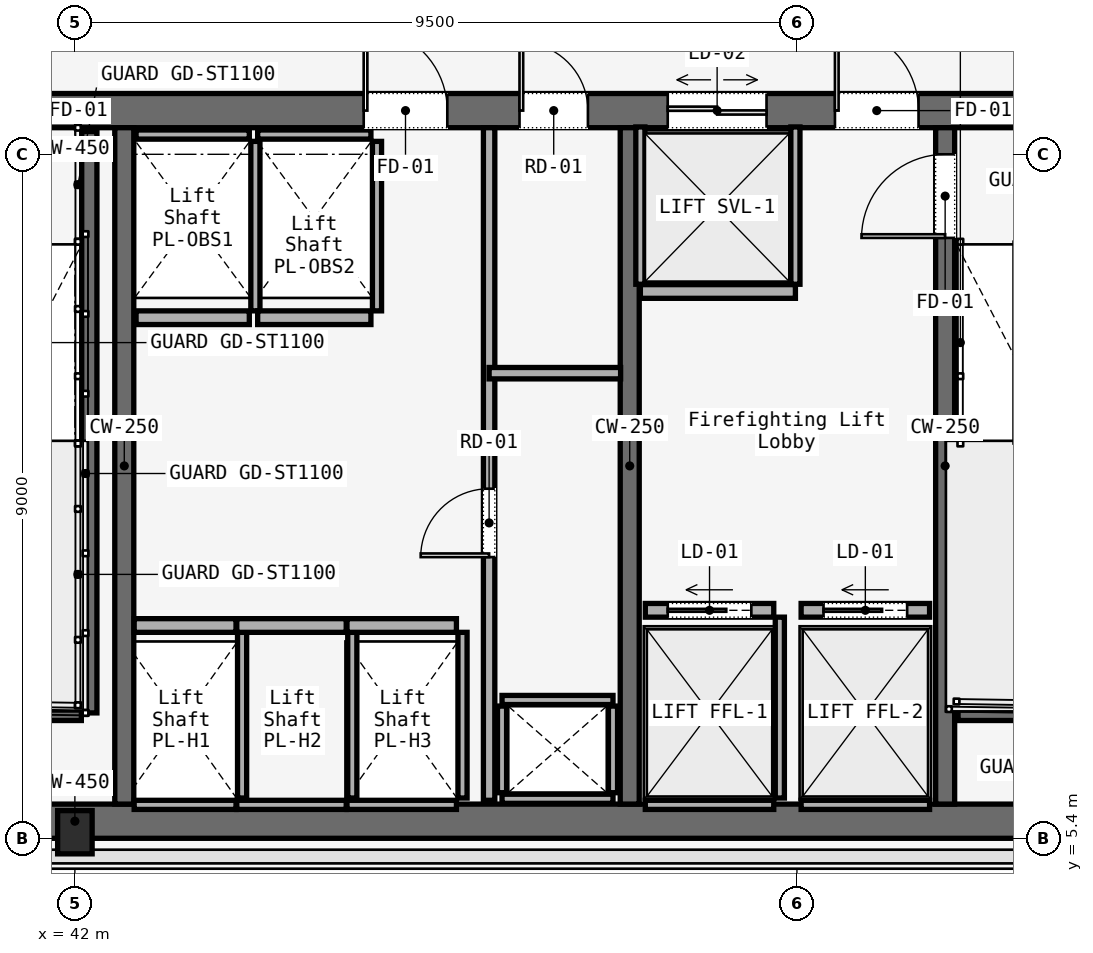
"""IFC4 building model, lengths in metres.
Left out: names, types, materials, properties, quantities, classifications, styles, units other than length and angle.
Written with IfcOpenShell. Run it as: python <this file> out.ifc"""

import sys

from ifc_helpers import new_model, si_unit, direction, frame, frame_2d, origin, origin_2d, place, context, subcontext, project, spatial, rectangle, i_section, extrude, element, fill, save


model = new_model("IFC4")
c1 = context("Model", 3, precision=1e-05, world=origin(), true_north=direction((0.0, 1.0)))
c2 = subcontext(c1, "Body", "Model", "MODEL_VIEW")
j1 = project(units=[si_unit("LENGTHUNIT", "METRE"), si_unit("PLANEANGLEUNIT", "RADIAN")], contexts=[c1])
p1 = place(None, origin())
s1 = spatial("IfcSite", under=j1, at=p1, CompositionType="ELEMENT")
p2 = place(p1, origin())
s2 = spatial("IfcBuilding", under=s1, at=p2, CompositionType="ELEMENT")
p3 = place(p2, frame((0.0, 0.0, 43.6)))
s3 = spatial("IfcBuildingStorey", under=s2, at=p3, CompositionType="ELEMENT", Elevation=43.6)
p4 = place(p3, frame((26.45, 14.975, 0.0), z_axis=(0.0, 0.0, 1.0), x_axis=(1.0, 0.0, 0.0)))
e1 = element("IfcWall", 1, at=p4, inside=s3, PredefinedType="SOLIDWALL", context=c2, shape_type="SweptSolid", body=[
    extrude(rectangle(XDim=31.1, YDim=0.45, at=frame_2d((15.55, 0.0))), origin(), (0.0, 0.0, 1.0), 3.58),
])
p5 = place(p4, frame((1.65, 0.0, 0.0)))
e2 = element("IfcOpeningElement", 2, at=p5, cuts=e1, PredefinedType="OPENING", context=c2, shape_type="SweptSolid", body=[
    extrude(rectangle(XDim=1.1, YDim=2.2, at=frame_2d((0.55, 1.1))), frame((0.0, 0.225, 0.0), z_axis=(0.0, -1.0, 0.0), x_axis=(1.0, 0.0, 0.0)), (0.0, 0.0, 1.0), 0.45),
])
p6 = place(p4, frame((13.65, 0.0, 0.0)))
e3 = element("IfcOpeningElement", 3, at=p6, cuts=e1, PredefinedType="OPENING", context=c2, shape_type="SweptSolid", body=[
    extrude(rectangle(XDim=1.1, YDim=2.2, at=frame_2d((0.55, 1.1))), frame((0.0, 0.225, 0.0), z_axis=(0.0, -1.0, 0.0), x_axis=(1.0, 0.0, 0.0)), (0.0, 0.0, 1.0), 0.45),
])
p7 = place(p4, frame((25.55, 0.0, 0.0)))
e4 = element("IfcOpeningElement", 4, at=p7, cuts=e1, PredefinedType="OPENING", context=c2, shape_type="SweptSolid", body=[
    extrude(rectangle(XDim=1.1, YDim=2.2, at=frame_2d((0.55, 1.1))), frame((0.0, 0.225, 0.0), z_axis=(0.0, -1.0, 0.0), x_axis=(1.0, 0.0, 0.0)), (0.0, 0.0, 1.0), 0.45),
])
p8 = place(p4, frame((10.7, 0.0, 0.0)))
e5 = element("IfcOpeningElement", 5, at=p8, cuts=e1, PredefinedType="OPENING", context=c2, shape_type="SweptSolid", body=[
    extrude(rectangle(XDim=1.4, YDim=2.2, at=frame_2d((0.7, 1.1))), frame((0.0, 0.225, 0.0), z_axis=(0.0, -1.0, 0.0), x_axis=(1.0, 0.0, 0.0)), (0.0, 0.0, 1.0), 0.45),
])
p9 = place(p4, frame((19.35, 0.0, 0.0)))
e6 = element("IfcOpeningElement", 6, at=p9, cuts=e1, PredefinedType="OPENING", context=c2, shape_type="SweptSolid", body=[
    extrude(rectangle(XDim=1.1, YDim=2.2, at=frame_2d((0.55, 1.1))), frame((0.0, 0.225, 0.0), z_axis=(0.0, -1.0, 0.0), x_axis=(1.0, 0.0, 0.0)), (0.0, 0.0, 1.0), 0.45),
])
p10 = place(p4, frame((21.4, 0.0, 0.0)))
e7 = element("IfcOpeningElement", 7, at=p10, cuts=e1, PredefinedType="OPENING", context=c2, shape_type="SweptSolid", body=[
    extrude(rectangle(XDim=0.9, YDim=2.1, at=frame_2d((0.45, 1.05))), frame((0.0, 0.225, 0.0), z_axis=(0.0, -1.0, 0.0), x_axis=(1.0, 0.0, 0.0)), (0.0, 0.0, 1.0), 0.45),
])
p11 = place(p4, frame((23.35, 0.0, 0.0)))
e8 = element("IfcOpeningElement", 8, at=p11, cuts=e1, PredefinedType="OPENING", context=c2, shape_type="SweptSolid", body=[
    extrude(rectangle(XDim=1.3, YDim=2.3, at=frame_2d((0.65, 1.15))), frame((0.0, 0.225, 0.0), z_axis=(0.0, -1.0, 0.0), x_axis=(1.0, 0.0, 0.0)), (0.0, 0.0, 1.0), 0.45),
])
p12 = place(p3, frame((26.45, 5.625, 0.0), z_axis=(0.0, 0.0, 1.0), x_axis=(1.0, 0.0, 0.0)))
e9 = element("IfcWall", 9, at=p12, inside=s3, PredefinedType="SOLIDWALL", context=c2, shape_type="SweptSolid", body=[
    extrude(rectangle(XDim=31.1, YDim=0.45, at=frame_2d((15.55, 0.0))), origin(), (0.0, 0.0, 1.0), 3.58),
])
for number, where, z_axis, x_axis in (
    (10, (42.65, 5.85, 0.0), (0.0, 0.0, 1.0), (0.0, 1.0, 0.0)),
    (11, (49.3, 5.85, 0.0), (0.0, 0.0, 1.0), (0.0, 1.0, 0.0)),
):
    element("IfcWall", number, at=place(p3, frame(where, z_axis=z_axis, x_axis=x_axis)), inside=s3, PredefinedType="SOLIDWALL", context=c2, shape_type="SweptSolid", body=[
        extrude(rectangle(XDim=8.9, YDim=0.25, at=frame_2d((4.45, 0.0))), origin(), (0.0, 0.0, 1.0), 3.58),
    ])
p13 = place(p3, frame((53.45, 5.85, 0.0), z_axis=(0.0, 0.0, 1.0), x_axis=(0.0, 1.0, 0.0)))
e12 = element("IfcWall", 12, at=p13, inside=s3, PredefinedType="SOLIDWALL", context=c2, shape_type="SweptSolid", body=[
    extrude(rectangle(XDim=8.9, YDim=0.25, at=frame_2d((4.45, 0.0))), origin(), (0.0, 0.0, 1.0), 3.58),
])
p14 = place(p13, frame((7.45, 0.0, 0.0)))
e13 = element("IfcOpeningElement", 13, at=p14, cuts=e12, PredefinedType="OPENING", context=c2, shape_type="SweptSolid", body=[
    extrude(rectangle(XDim=1.1, YDim=2.2, at=frame_2d((0.55, 1.1))), frame((0.0, 0.125, 0.0), z_axis=(0.0, -1.0, 0.0), x_axis=(1.0, 0.0, 0.0)), (0.0, 0.0, 1.0), 0.25),
])
p15 = place(p3, frame((42.0, 5.48, 0.0), z_axis=(0.0, 0.0, 1.0), x_axis=(1.0, 0.0, 0.0)))
e14 = element("IfcColumn", 14, at=p15, inside=s3, PredefinedType="COLUMN", context=c2, shape_type="SweptSolid", body=[
    extrude(i_section(OverallWidth=0.454, OverallDepth=0.569, WebThickness=0.078, FlangeThickness=0.08, FilletRadius=0.015, at=origin_2d()), origin(), (0.0, 0.0, 1.0), 3.58),
])
p16 = place(p3, frame((42.19, 14.7, 0.0), z_axis=(0.0, 0.0, 1.0), x_axis=(0.0, -1.0, 0.0)))
e15 = element("IfcWall", 15, at=p16, inside=s3, PredefinedType="SOLIDWALL", context=c2, shape_type="SweptSolid", body=[
    extrude(rectangle(XDim=7.65, YDim=0.2, at=frame_2d((3.825, 0.0))), origin(), (0.0, 0.0, 1.0), 3.8),
])
for number, where, z_axis, x_axis in (
    (16, (38.97, 7.05, 0.0), (0.0, 0.0, 1.0), (1.0, 0.0, 0.0)),
    (17, (53.62, 7.05, 0.0), (0.0, 0.0, 1.0), (1.0, 0.0, 0.0)),
):
    element("IfcWall", number, at=place(p3, frame(where, z_axis=z_axis, x_axis=x_axis)), inside=s3, PredefinedType="SOLIDWALL", context=c2, shape_type="SweptSolid", body=[
        extrude(rectangle(XDim=3.115, YDim=0.2, at=frame_2d((1.558, 0.0))), origin(), (0.0, 0.0, 1.0), 3.8),
    ])
for number, where, z_axis, x_axis in (
    (18, (47.62, 5.92, 0.0), (0.0, 0.0, 1.0), (1.0, 0.0, 0.0)),
    (19, (47.62, 7.22, 0.0), (0.0, 0.0, 1.0), (1.0, 0.0, 0.0)),
):
    element("IfcWall", number, at=place(p3, frame(where, z_axis=z_axis, x_axis=x_axis)), inside=s3, PredefinedType="SOLIDWALL", context=c2, shape_type="SweptSolid", body=[
        extrude(rectangle(XDim=1.46, YDim=0.12, at=frame_2d((0.73, 0.0))), origin(), (0.0, 0.0, 1.0), 2.933),
    ])
for number, where, z_axis, x_axis in (
    (20, (47.62, 6.0, 0.0), (0.0, 0.0, 1.0), (0.0, 1.0, 0.0)),
    (21, (49.08, 6.0, 0.0), (0.0, 0.0, 1.0), (0.0, 1.0, 0.0)),
):
    element("IfcWall", number, at=place(p3, frame(where, z_axis=z_axis, x_axis=x_axis)), inside=s3, PredefinedType="SOLIDWALL", context=c2, shape_type="SweptSolid", body=[
        extrude(rectangle(XDim=1.14, YDim=0.12, at=frame_2d((0.57, 0.0))), origin(), (0.0, 0.0, 1.0), 2.933),
    ])
p17 = place(p3, frame((47.45, 5.9, 0.0), z_axis=(0.0, 0.0, 1.0), x_axis=(0.0, 1.0, 0.0)))
e22 = element("IfcWall", 22, at=p17, inside=s3, PredefinedType="PARTITIONING", context=c2, shape_type="SweptSolid", body=[
    extrude(rectangle(XDim=8.85, YDim=0.15, at=frame_2d((4.425, 0.0))), origin(), (0.0, 0.0, 1.0), 2.933),
])
p18 = place(p17, frame((3.2, 0.0, 0.0)))
e23 = element("IfcOpeningElement", 23, at=p18, cuts=e22, PredefinedType="OPENING", context=c2, shape_type="SweptSolid", body=[
    extrude(rectangle(XDim=0.9, YDim=2.1, at=frame_2d((0.45, 1.05))), frame((0.0, 0.075, 0.0), z_axis=(0.0, -1.0, 0.0), x_axis=(1.0, 0.0, 0.0)), (0.0, 0.0, 1.0), 0.15),
])
p19 = place(p3, frame((47.45, 11.52, 0.0), z_axis=(0.0, 0.0, 1.0), x_axis=(1.0, 0.0, 0.0)))
e24 = element("IfcWall", 24, at=p19, inside=s3, PredefinedType="PARTITIONING", context=c2, shape_type="SweptSolid", body=[
    extrude(rectangle(XDim=1.73, YDim=0.15, at=frame_2d((0.865, 0.0))), origin(), (0.0, 0.0, 1.0), 2.933),
])
p20 = place(p3, frame((42.78, 8.2, 0.0), z_axis=(0.0, 0.0, 1.0), x_axis=(1.0, 0.0, 0.0)))
e25 = element("IfcWall", 25, at=p20, inside=s3, PredefinedType="SOLIDWALL", context=c2, shape_type="SweptSolid", body=[
    extrude(rectangle(XDim=1.34, YDim=0.18, at=frame_2d((0.67, 0.0))), origin(), (0.0, 0.0, 1.0), 2.933),
])
p21 = place(p3, frame((42.78, 5.84, 0.0), z_axis=(0.0, 0.0, 1.0), x_axis=(1.0, 0.0, 0.0)))
e26 = element("IfcWall", 26, at=p21, inside=s3, PredefinedType="SOLIDWALL", context=c2, shape_type="SweptSolid", body=[
    extrude(rectangle(XDim=1.34, YDim=0.12, at=frame_2d((0.67, 0.0))), origin(), (0.0, 0.0, 1.0), 2.933),
])
p22 = place(p3, frame((44.2, 5.93, 0.0), z_axis=(0.0, 0.0, 1.0), x_axis=(0.0, 1.0, 0.0)))
e27 = element("IfcWall", 27, at=p22, inside=s3, PredefinedType="SOLIDWALL", context=c2, shape_type="SweptSolid", body=[
    extrude(rectangle(XDim=2.18, YDim=0.12, at=frame_2d((1.09, 0.0))), origin(), (0.0, 0.0, 1.0), 2.933),
])
p23 = place(p3, frame((44.13, 8.2, 0.0), z_axis=(0.0, 0.0, 1.0), x_axis=(1.0, 0.0, 0.0)))
e28 = element("IfcWall", 28, at=p23, inside=s3, PredefinedType="SOLIDWALL", context=c2, shape_type="SweptSolid", body=[
    extrude(rectangle(XDim=1.44, YDim=0.18, at=frame_2d((0.72, 0.0))), origin(), (0.0, 0.0, 1.0), 2.933),
])
p24 = place(p3, frame((44.13, 5.84, 0.0), z_axis=(0.0, 0.0, 1.0), x_axis=(1.0, 0.0, 0.0)))
e29 = element("IfcWall", 29, at=p24, inside=s3, PredefinedType="SOLIDWALL", context=c2, shape_type="SweptSolid", body=[
    extrude(rectangle(XDim=1.44, YDim=0.12, at=frame_2d((0.72, 0.0))), origin(), (0.0, 0.0, 1.0), 2.933),
])
p25 = place(p3, frame((45.65, 5.93, 0.0), z_axis=(0.0, 0.0, 1.0), x_axis=(0.0, 1.0, 0.0)))
e30 = element("IfcWall", 30, at=p25, inside=s3, PredefinedType="SOLIDWALL", context=c2, shape_type="SweptSolid", body=[
    extrude(rectangle(XDim=2.18, YDim=0.12, at=frame_2d((1.09, 0.0))), origin(), (0.0, 0.0, 1.0), 2.933),
])
p26 = place(p3, frame((45.58, 8.2, 0.0), z_axis=(0.0, 0.0, 1.0), x_axis=(1.0, 0.0, 0.0)))
e31 = element("IfcWall", 31, at=p26, inside=s3, PredefinedType="SOLIDWALL", context=c2, shape_type="SweptSolid", body=[
    extrude(rectangle(XDim=1.44, YDim=0.18, at=frame_2d((0.72, 0.0))), origin(), (0.0, 0.0, 1.0), 2.933),
])
p27 = place(p3, frame((45.58, 5.84, 0.0), z_axis=(0.0, 0.0, 1.0), x_axis=(1.0, 0.0, 0.0)))
e32 = element("IfcWall", 32, at=p27, inside=s3, PredefinedType="SOLIDWALL", context=c2, shape_type="SweptSolid", body=[
    extrude(rectangle(XDim=1.44, YDim=0.12, at=frame_2d((0.72, 0.0))), origin(), (0.0, 0.0, 1.0), 2.933),
])
p28 = place(p3, frame((47.1, 5.93, 0.0), z_axis=(0.0, 0.0, 1.0), x_axis=(0.0, 1.0, 0.0)))
e33 = element("IfcWall", 33, at=p28, inside=s3, PredefinedType="SOLIDWALL", context=c2, shape_type="SweptSolid", body=[
    extrude(rectangle(XDim=2.18, YDim=0.12, at=frame_2d((1.09, 0.0))), origin(), (0.0, 0.0, 1.0), 2.933),
])
p29 = place(p3, frame((42.805, 12.25, 0.0), z_axis=(0.0, 0.0, 1.0), x_axis=(1.0, 0.0, 0.0)))
e34 = element("IfcWall", 34, at=p29, inside=s3, PredefinedType="SOLIDWALL", context=c2, shape_type="SweptSolid", body=[
    extrude(rectangle(XDim=1.49, YDim=0.18, at=frame_2d((0.745, 0.0))), origin(), (0.0, 0.0, 1.0), 2.933),
])
p30 = place(p3, frame((42.805, 14.66, 0.0), z_axis=(0.0, 0.0, 1.0), x_axis=(1.0, 0.0, 0.0)))
e35 = element("IfcWall", 35, at=p30, inside=s3, PredefinedType="SOLIDWALL", context=c2, shape_type="SweptSolid", body=[
    extrude(rectangle(XDim=1.49, YDim=0.12, at=frame_2d((0.745, 0.0))), origin(), (0.0, 0.0, 1.0), 2.933),
])
p31 = place(p3, frame((44.375, 12.34, 0.0), z_axis=(0.0, 0.0, 1.0), x_axis=(0.0, 1.0, 0.0)))
e36 = element("IfcWall", 36, at=p31, inside=s3, PredefinedType="SOLIDWALL", context=c2, shape_type="SweptSolid", body=[
    extrude(rectangle(XDim=2.23, YDim=0.12, at=frame_2d((1.115, 0.0))), origin(), (0.0, 0.0, 1.0), 2.933),
])
p32 = place(p3, frame((44.405, 12.25, 0.0), z_axis=(0.0, 0.0, 1.0), x_axis=(1.0, 0.0, 0.0)))
e37 = element("IfcWall", 37, at=p32, inside=s3, PredefinedType="SOLIDWALL", context=c2, shape_type="SweptSolid", body=[
    extrude(rectangle(XDim=1.49, YDim=0.18, at=frame_2d((0.745, 0.0))), origin(), (0.0, 0.0, 1.0), 2.933),
])
p33 = place(p3, frame((44.405, 14.66, 0.0), z_axis=(0.0, 0.0, 1.0), x_axis=(1.0, 0.0, 0.0)))
e38 = element("IfcWall", 38, at=p33, inside=s3, PredefinedType="SOLIDWALL", context=c2, shape_type="SweptSolid", body=[
    extrude(rectangle(XDim=1.49, YDim=0.12, at=frame_2d((0.745, 0.0))), origin(), (0.0, 0.0, 1.0), 2.933),
])
p34 = place(p3, frame((45.975, 12.34, 0.0), z_axis=(0.0, 0.0, 1.0), x_axis=(0.0, 1.0, 0.0)))
e39 = element("IfcWall", 39, at=p34, inside=s3, PredefinedType="SOLIDWALL", context=c2, shape_type="SweptSolid", body=[
    extrude(rectangle(XDim=2.23, YDim=0.12, at=frame_2d((1.115, 0.0))), origin(), (0.0, 0.0, 1.0), 2.933),
])
p35 = place(p3, frame((49.505, 8.4, 0.0), z_axis=(0.0, 0.0, 1.0), x_axis=(1.0, 0.0, 0.0)))
e40 = element("IfcWall", 40, at=p35, inside=s3, PredefinedType="SOLIDWALL", context=c2, shape_type="SweptSolid", body=[
    extrude(rectangle(XDim=1.69, YDim=0.18, at=frame_2d((0.845, 0.0))), origin(), (0.0, 0.0, 1.0), 2.933),
])
p36 = place(p35, frame((0.295, 0.0, 0.0)))
e41 = element("IfcOpeningElement", 41, at=p36, cuts=e40, PredefinedType="OPENING", context=c2, shape_type="SweptSolid", body=[
    extrude(rectangle(XDim=1.1, YDim=2.2, at=frame_2d((0.55, 1.1))), frame((0.0, 0.09, 0.0), z_axis=(0.0, -1.0, 0.0), x_axis=(1.0, 0.0, 0.0)), (0.0, 0.0, 1.0), 0.18),
])
p37 = place(p3, frame((49.505, 5.84, 0.0), z_axis=(0.0, 0.0, 1.0), x_axis=(1.0, 0.0, 0.0)))
e42 = element("IfcWall", 42, at=p37, inside=s3, PredefinedType="SOLIDWALL", context=c2, shape_type="SweptSolid", body=[
    extrude(rectangle(XDim=1.69, YDim=0.12, at=frame_2d((0.845, 0.0))), origin(), (0.0, 0.0, 1.0), 2.933),
])
p38 = place(p3, frame((51.275, 5.93, 0.0), z_axis=(0.0, 0.0, 1.0), x_axis=(0.0, 1.0, 0.0)))
e43 = element("IfcWall", 43, at=p38, inside=s3, PredefinedType="SOLIDWALL", context=c2, shape_type="SweptSolid", body=[
    extrude(rectangle(XDim=2.38, YDim=0.12, at=frame_2d((1.19, 0.0))), origin(), (0.0, 0.0, 1.0), 2.933),
])
p39 = place(p3, frame((51.555, 8.4, 0.0), z_axis=(0.0, 0.0, 1.0), x_axis=(1.0, 0.0, 0.0)))
e44 = element("IfcWall", 44, at=p39, inside=s3, PredefinedType="SOLIDWALL", context=c2, shape_type="SweptSolid", body=[
    extrude(rectangle(XDim=1.69, YDim=0.18, at=frame_2d((0.845, 0.0))), origin(), (0.0, 0.0, 1.0), 2.933),
])
p40 = place(p39, frame((0.295, 0.0, 0.0)))
e45 = element("IfcOpeningElement", 45, at=p40, cuts=e44, PredefinedType="OPENING", context=c2, shape_type="SweptSolid", body=[
    extrude(rectangle(XDim=1.1, YDim=2.2, at=frame_2d((0.55, 1.1))), frame((0.0, 0.09, 0.0), z_axis=(0.0, -1.0, 0.0), x_axis=(1.0, 0.0, 0.0)), (0.0, 0.0, 1.0), 0.18),
])
p41 = place(p3, frame((51.555, 5.84, 0.0), z_axis=(0.0, 0.0, 1.0), x_axis=(1.0, 0.0, 0.0)))
e46 = element("IfcWall", 46, at=p41, inside=s3, PredefinedType="SOLIDWALL", context=c2, shape_type="SweptSolid", body=[
    extrude(rectangle(XDim=1.69, YDim=0.12, at=frame_2d((0.845, 0.0))), origin(), (0.0, 0.0, 1.0), 2.933),
])
p42 = place(p3, frame((49.44, 12.595, 0.0), z_axis=(0.0, 0.0, 1.0), x_axis=(1.0, 0.0, 0.0)))
e47 = element("IfcWall", 47, at=p42, inside=s3, PredefinedType="SOLIDWALL", context=c2, shape_type="SweptSolid", body=[
    extrude(rectangle(XDim=2.04, YDim=0.18, at=frame_2d((1.02, 0.0))), origin(), (0.0, 0.0, 1.0), 2.933),
])
for number, where, z_axis, x_axis in (
    (48, (49.44, 12.69, 0.0), (0.0, 0.0, 1.0), (0.0, 1.0, 0.0)),
    (49, (51.48, 12.69, 0.0), (0.0, 0.0, 1.0), (0.0, 1.0, 0.0)),
):
    element("IfcWall", number, at=place(p3, frame(where, z_axis=z_axis, x_axis=x_axis)), inside=s3, PredefinedType="SOLIDWALL", context=c2, shape_type="SweptSolid", body=[
        extrude(rectangle(XDim=2.07, YDim=0.12, at=frame_2d((1.035, 0.0))), origin(), (0.0, 0.0, 1.0), 2.933),
    ])
p43 = place(p7, origin())
e50 = element("IfcDoor", 50, at=p43, inside=s3, OperationType="SINGLE_SWING_RIGHT", PredefinedType="DOOR", context=c2, shape_type="SweptSolid", body=[
    extrude(rectangle(XDim=1.1, YDim=2.2, at=frame_2d((0.55, 1.1))), frame((0.0, 0.025, 0.0), z_axis=(0.0, -1.0, 0.0), x_axis=(1.0, 0.0, 0.0)), (0.0, 0.0, 1.0), 0.05),
])
fill(e4, e50)
p44 = place(p9, origin())
e51 = element("IfcDoor", 51, at=p44, inside=s3, OperationType="SINGLE_SWING_LEFT", PredefinedType="DOOR", context=c2, shape_type="SweptSolid", body=[
    extrude(rectangle(XDim=1.1, YDim=2.2, at=frame_2d((0.55, 1.1))), frame((0.0, 0.025, 0.0), z_axis=(0.0, -1.0, 0.0), x_axis=(1.0, 0.0, 0.0)), (0.0, 0.0, 1.0), 0.05),
])
fill(e6, e51)
p45 = place(p10, origin())
e52 = element("IfcDoor", 52, at=p45, inside=s3, OperationType="SINGLE_SWING_LEFT", PredefinedType="DOOR", context=c2, shape_type="SweptSolid", body=[
    extrude(rectangle(XDim=0.9, YDim=2.1, at=frame_2d((0.45, 1.05))), frame((0.0, 0.025, 0.0), z_axis=(0.0, -1.0, 0.0), x_axis=(1.0, 0.0, 0.0)), (0.0, 0.0, 1.0), 0.05),
])
fill(e7, e52)
p46 = place(p14, origin())
e53 = element("IfcDoor", 53, at=p46, inside=s3, OperationType="SINGLE_SWING_LEFT", PredefinedType="DOOR", context=c2, shape_type="SweptSolid", body=[
    extrude(rectangle(XDim=1.1, YDim=2.2, at=frame_2d((0.55, 1.1))), frame((0.0, 0.025, 0.0), z_axis=(0.0, -1.0, 0.0), x_axis=(1.0, 0.0, 0.0)), (0.0, 0.0, 1.0), 0.05),
])
fill(e13, e53)
p47 = place(p18, origin())
e54 = element("IfcDoor", 54, at=p47, inside=s3, OperationType="SINGLE_SWING_LEFT", PredefinedType="DOOR", context=c2, shape_type="SweptSolid", body=[
    extrude(rectangle(XDim=0.9, YDim=2.1, at=frame_2d((0.45, 1.05))), frame((0.0, 0.025, 0.0), z_axis=(0.0, -1.0, 0.0), x_axis=(1.0, 0.0, 0.0)), (0.0, 0.0, 1.0), 0.05),
])
fill(e23, e54)
p48 = place(p36, origin())
e55 = element("IfcDoor", 55, at=p48, inside=s3, OperationType="SLIDING_TO_LEFT", PredefinedType="DOOR", context=c2, shape_type="SweptSolid", body=[
    extrude(rectangle(XDim=1.1, YDim=2.2, at=frame_2d((0.55, 1.1))), frame((0.0, 0.025, 0.0), z_axis=(0.0, -1.0, 0.0), x_axis=(1.0, 0.0, 0.0)), (0.0, 0.0, 1.0), 0.05),
])
fill(e41, e55)
p49 = place(p40, origin())
e56 = element("IfcDoor", 56, at=p49, inside=s3, OperationType="SLIDING_TO_LEFT", PredefinedType="DOOR", context=c2, shape_type="SweptSolid", body=[
    extrude(rectangle(XDim=1.1, YDim=2.2, at=frame_2d((0.55, 1.1))), frame((0.0, 0.025, 0.0), z_axis=(0.0, -1.0, 0.0), x_axis=(1.0, 0.0, 0.0)), (0.0, 0.0, 1.0), 0.05),
])
fill(e45, e56)
p50 = place(p11, origin())
e57 = element("IfcDoor", 57, at=p50, inside=s3, OperationType="DOUBLE_DOOR_SLIDING", PredefinedType="DOOR", context=c2, shape_type="SweptSolid", body=[
    extrude(rectangle(XDim=1.3, YDim=2.3, at=frame_2d((0.65, 1.15))), frame((0.0, 0.025, 0.0), z_axis=(0.0, -1.0, 0.0), x_axis=(1.0, 0.0, 0.0)), (0.0, 0.0, 1.0), 0.05),
])
fill(e8, e57)
save(model, sys.argv[1])
